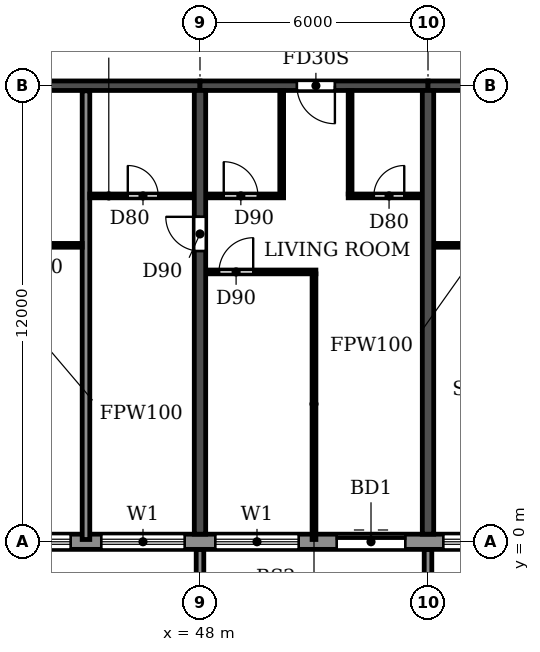
"""IFC4 building model, lengths in metres.
Left out: names, types, materials, properties, quantities, classifications, styles, units other than length and angle.
Written with IfcOpenShell. Run it as: python <this file> out.ifc"""

import sys

from ifc_helpers import new_model, si_unit, direction, frame, frame_2d, origin, place, context, subcontext, project, spatial, polyline, rectangle, outline, extrude, source, transform, mapped, element, fill, save


model = new_model("IFC4")
c1 = context("Model", 3, precision=1e-05, world=origin(), true_north=direction((0.0, 1.0)))
c2 = subcontext(c1, "Body", "Model", "MODEL_VIEW")
j1 = project(units=[si_unit("LENGTHUNIT", "METRE"), si_unit("PLANEANGLEUNIT", "RADIAN")], contexts=[c1])
p1 = place(None, origin())
s1 = spatial("IfcSite", under=j1, at=p1, CompositionType="ELEMENT")
p2 = place(p1, origin())
s2 = spatial("IfcBuilding", under=s1, at=p2, CompositionType="ELEMENT")
p3 = place(p2, frame((0.0, 0.0, 125.7)))
s3 = spatial("IfcBuildingStorey", under=s2, at=p3, CompositionType="ELEMENT", Elevation=125.7)
p4 = place(p3, frame((48.0, 0.2, 0.0), z_axis=(0.0, 0.0, 1.0), x_axis=(0.0, 1.0, 0.0)))
e1 = element("IfcWall", 1, at=p4, inside=s3, PredefinedType="SHEAR", context=c2, shape_type="SweptSolid", body=[
    extrude(rectangle(XDim=11.675, YDim=0.3, at=frame_2d((5.837, 0.0))), origin(), (0.0, 0.0, 1.0), 3.07),
])
p5 = place(p4, frame((7.45, 0.0, 0.0)))
e2 = element("IfcOpeningElement", 2, at=p5, cuts=e1, PredefinedType="OPENING", context=c2, shape_type="SweptSolid", body=[
    extrude(rectangle(XDim=0.9, YDim=2.1, at=frame_2d((0.45, 1.05))), frame((0.0, 0.16, 0.0), z_axis=(0.0, -1.0, 0.0), x_axis=(1.0, 0.0, 0.0)), (0.0, 0.0, 1.0), 0.32),
])
p6 = place(p3, frame((54.0, 0.2, 0.0), z_axis=(0.0, 0.0, 1.0), x_axis=(0.0, 1.0, 0.0)))
e3 = element("IfcWall", 3, at=p6, inside=s3, PredefinedType="SHEAR", context=c2, shape_type="SweptSolid", body=[
    extrude(rectangle(XDim=11.675, YDim=0.3, at=frame_2d((5.837, 0.0))), origin(), (0.0, 0.0, 1.0), 3.07),
])
p7 = place(p3, frame((42.0, 12.0, 0.0), z_axis=(0.0, 0.0, 1.0), x_axis=(1.0, 0.0, 0.0)))
e4 = element("IfcWall", 4, at=p7, inside=s3, PredefinedType="SHEAR", context=c2, shape_type="SweptSolid", body=[
    extrude(rectangle(XDim=6.0, YDim=0.25, at=frame_2d((3.0, 0.0))), origin(), (0.0, 0.0, 1.0), 2.47),
])
p8 = place(p3, frame((48.0, 12.0, 0.0), z_axis=(0.0, 0.0, 1.0), x_axis=(1.0, 0.0, 0.0)))
e5 = element("IfcWall", 5, at=p8, inside=s3, PredefinedType="SHEAR", context=c2, shape_type="SweptSolid", body=[
    extrude(rectangle(XDim=6.0, YDim=0.25, at=frame_2d((3.0, 0.0))), origin(), (0.0, 0.0, 1.0), 2.47),
])
p9 = place(p8, frame((2.55, 0.0, 0.0)))
e6 = element("IfcOpeningElement", 6, at=p9, cuts=e5, PredefinedType="OPENING", context=c2, shape_type="SweptSolid", body=[
    extrude(rectangle(XDim=1.0, YDim=2.1, at=frame_2d((0.5, 1.05))), frame((0.0, 0.135, 0.0), z_axis=(0.0, -1.0, 0.0), x_axis=(1.0, 0.0, 0.0)), (0.0, 0.0, 1.0), 0.27),
])
p10 = place(p3, frame((54.0, 12.0, 0.0), z_axis=(0.0, 0.0, 1.0), x_axis=(1.0, 0.0, 0.0)))
e7 = element("IfcWall", 7, at=p10, inside=s3, PredefinedType="SHEAR", context=c2, shape_type="SweptSolid", body=[
    extrude(rectangle(XDim=6.0, YDim=0.25, at=frame_2d((3.0, 0.0))), origin(), (0.0, 0.0, 1.0), 2.47),
])
p11 = place(p10, frame((2.45, 0.0, 0.0)))
e8 = element("IfcOpeningElement", 8, at=p11, cuts=e7, PredefinedType="OPENING", context=c2, shape_type="SweptSolid", body=[
    extrude(rectangle(XDim=1.0, YDim=2.1, at=frame_2d((0.5, 1.05))), frame((0.0, 0.135, 0.0), z_axis=(0.0, -1.0, 0.0), x_axis=(1.0, 0.0, 0.0)), (0.0, 0.0, 1.0), 0.27),
])
p12 = place(p3, frame((16.683, 0.0, 0.0), z_axis=(0.0, 0.0, 1.0), x_axis=(1.0, 0.0, 0.0)))
e9 = element("IfcWall", 9, at=p12, inside=s3, PredefinedType="STANDARD", context=c2, shape_type="SweptSolid", body=[
    extrude(rectangle(XDim=68.634, YDim=0.4, at=frame_2d((34.317, 0.0))), origin(), (0.0, 0.0, 1.0), 3.07),
])
p13 = place(p12, frame((1.717, 0.0, 0.9)))
e10 = element("IfcOpeningElement", 10, at=p13, cuts=e9, PredefinedType="OPENING", context=c2, shape_type="SweptSolid", body=[
    extrude(rectangle(XDim=2.2, YDim=1.5, at=frame_2d((1.1, 0.75))), frame((0.0, 0.21, 0.0), z_axis=(0.0, -1.0, 0.0), x_axis=(1.0, 0.0, 0.0)), (0.0, 0.0, 1.0), 0.42),
])
p14 = place(p12, frame((4.717, 0.0, 0.9)))
e11 = element("IfcOpeningElement", 11, at=p14, cuts=e9, PredefinedType="OPENING", context=c2, shape_type="SweptSolid", body=[
    extrude(rectangle(XDim=2.2, YDim=1.5, at=frame_2d((1.1, 0.75))), frame((0.0, 0.21, 0.0), z_axis=(0.0, -1.0, 0.0), x_axis=(1.0, 0.0, 0.0)), (0.0, 0.0, 1.0), 0.42),
])
p15 = place(p12, frame((7.717, 0.0, 0.9)))
e12 = element("IfcOpeningElement", 12, at=p15, cuts=e9, PredefinedType="OPENING", context=c2, shape_type="SweptSolid", body=[
    extrude(rectangle(XDim=2.2, YDim=1.5, at=frame_2d((1.1, 0.75))), frame((0.0, 0.21, 0.0), z_axis=(0.0, -1.0, 0.0), x_axis=(1.0, 0.0, 0.0)), (0.0, 0.0, 1.0), 0.42),
])
p16 = place(p12, frame((10.717, 0.0, 0.9)))
e13 = element("IfcOpeningElement", 13, at=p16, cuts=e9, PredefinedType="OPENING", context=c2, shape_type="SweptSolid", body=[
    extrude(rectangle(XDim=2.2, YDim=1.5, at=frame_2d((1.1, 0.75))), frame((0.0, 0.21, 0.0), z_axis=(0.0, -1.0, 0.0), x_axis=(1.0, 0.0, 0.0)), (0.0, 0.0, 1.0), 0.42),
])
p17 = place(p12, frame((13.717, 0.0, 0.9)))
e14 = element("IfcOpeningElement", 14, at=p17, cuts=e9, PredefinedType="OPENING", context=c2, shape_type="SweptSolid", body=[
    extrude(rectangle(XDim=2.2, YDim=1.5, at=frame_2d((1.1, 0.75))), frame((0.0, 0.21, 0.0), z_axis=(0.0, -1.0, 0.0), x_axis=(1.0, 0.0, 0.0)), (0.0, 0.0, 1.0), 0.42),
])
p18 = place(p12, frame((16.717, 0.0, 0.9)))
e15 = element("IfcOpeningElement", 15, at=p18, cuts=e9, PredefinedType="OPENING", context=c2, shape_type="SweptSolid", body=[
    extrude(rectangle(XDim=2.2, YDim=1.5, at=frame_2d((1.1, 0.75))), frame((0.0, 0.21, 0.0), z_axis=(0.0, -1.0, 0.0), x_axis=(1.0, 0.0, 0.0)), (0.0, 0.0, 1.0), 0.42),
])
p19 = place(p12, frame((19.717, 0.0, 0.9)))
e16 = element("IfcOpeningElement", 16, at=p19, cuts=e9, PredefinedType="OPENING", context=c2, shape_type="SweptSolid", body=[
    extrude(rectangle(XDim=2.2, YDim=1.5, at=frame_2d((1.1, 0.75))), frame((0.0, 0.21, 0.0), z_axis=(0.0, -1.0, 0.0), x_axis=(1.0, 0.0, 0.0)), (0.0, 0.0, 1.0), 0.42),
])
p20 = place(p12, frame((22.917, 0.0, 0.0)))
e17 = element("IfcOpeningElement", 17, at=p20, cuts=e9, PredefinedType="OPENING", context=c2, shape_type="SweptSolid", body=[
    extrude(rectangle(XDim=1.8, YDim=2.4, at=frame_2d((0.9, 1.2))), frame((0.0, 0.21, 0.0), z_axis=(0.0, -1.0, 0.0), x_axis=(1.0, 0.0, 0.0)), (0.0, 0.0, 1.0), 0.42),
])
p21 = place(p12, frame((25.717, 0.0, 0.9)))
e18 = element("IfcOpeningElement", 18, at=p21, cuts=e9, PredefinedType="OPENING", context=c2, shape_type="SweptSolid", body=[
    extrude(rectangle(XDim=2.2, YDim=1.5, at=frame_2d((1.1, 0.75))), frame((0.0, 0.21, 0.0), z_axis=(0.0, -1.0, 0.0), x_axis=(1.0, 0.0, 0.0)), (0.0, 0.0, 1.0), 0.42),
])
p22 = place(p12, frame((28.717, 0.0, 0.9)))
e19 = element("IfcOpeningElement", 19, at=p22, cuts=e9, PredefinedType="OPENING", context=c2, shape_type="SweptSolid", body=[
    extrude(rectangle(XDim=2.2, YDim=1.5, at=frame_2d((1.1, 0.75))), frame((0.0, 0.21, 0.0), z_axis=(0.0, -1.0, 0.0), x_axis=(1.0, 0.0, 0.0)), (0.0, 0.0, 1.0), 0.42),
])
p23 = place(p12, frame((31.717, 0.0, 0.9)))
e20 = element("IfcOpeningElement", 20, at=p23, cuts=e9, PredefinedType="OPENING", context=c2, shape_type="SweptSolid", body=[
    extrude(rectangle(XDim=2.2, YDim=1.5, at=frame_2d((1.1, 0.75))), frame((0.0, 0.21, 0.0), z_axis=(0.0, -1.0, 0.0), x_axis=(1.0, 0.0, 0.0)), (0.0, 0.0, 1.0), 0.42),
])
p24 = place(p12, frame((34.917, 0.0, 0.0)))
e21 = element("IfcOpeningElement", 21, at=p24, cuts=e9, PredefinedType="OPENING", context=c2, shape_type="SweptSolid", body=[
    extrude(rectangle(XDim=1.8, YDim=2.4, at=frame_2d((0.9, 1.2))), frame((0.0, 0.21, 0.0), z_axis=(0.0, -1.0, 0.0), x_axis=(1.0, 0.0, 0.0)), (0.0, 0.0, 1.0), 0.42),
])
p25 = place(p12, frame((37.717, 0.0, 0.9)))
e22 = element("IfcOpeningElement", 22, at=p25, cuts=e9, PredefinedType="OPENING", context=c2, shape_type="SweptSolid", body=[
    extrude(rectangle(XDim=2.2, YDim=1.5, at=frame_2d((1.1, 0.75))), frame((0.0, 0.21, 0.0), z_axis=(0.0, -1.0, 0.0), x_axis=(1.0, 0.0, 0.0)), (0.0, 0.0, 1.0), 0.42),
])
p26 = place(p12, frame((40.717, 0.0, 0.9)))
e23 = element("IfcOpeningElement", 23, at=p26, cuts=e9, PredefinedType="OPENING", context=c2, shape_type="SweptSolid", body=[
    extrude(rectangle(XDim=2.2, YDim=1.5, at=frame_2d((1.1, 0.75))), frame((0.0, 0.21, 0.0), z_axis=(0.0, -1.0, 0.0), x_axis=(1.0, 0.0, 0.0)), (0.0, 0.0, 1.0), 0.42),
])
p27 = place(p12, frame((43.717, 0.0, 0.9)))
e24 = element("IfcOpeningElement", 24, at=p27, cuts=e9, PredefinedType="OPENING", context=c2, shape_type="SweptSolid", body=[
    extrude(rectangle(XDim=2.2, YDim=1.5, at=frame_2d((1.1, 0.75))), frame((0.0, 0.21, 0.0), z_axis=(0.0, -1.0, 0.0), x_axis=(1.0, 0.0, 0.0)), (0.0, 0.0, 1.0), 0.42),
])
p28 = place(p12, frame((46.917, 0.0, 0.0)))
e25 = element("IfcOpeningElement", 25, at=p28, cuts=e9, PredefinedType="OPENING", context=c2, shape_type="SweptSolid", body=[
    extrude(rectangle(XDim=1.8, YDim=2.4, at=frame_2d((0.9, 1.2))), frame((0.0, 0.21, 0.0), z_axis=(0.0, -1.0, 0.0), x_axis=(1.0, 0.0, 0.0)), (0.0, 0.0, 1.0), 0.42),
])
p29 = place(p12, frame((49.717, 0.0, 0.9)))
e26 = element("IfcOpeningElement", 26, at=p29, cuts=e9, PredefinedType="OPENING", context=c2, shape_type="SweptSolid", body=[
    extrude(rectangle(XDim=2.2, YDim=1.5, at=frame_2d((1.1, 0.75))), frame((0.0, 0.21, 0.0), z_axis=(0.0, -1.0, 0.0), x_axis=(1.0, 0.0, 0.0)), (0.0, 0.0, 1.0), 0.42),
])
p30 = place(p12, frame((52.717, 0.0, 0.9)))
e27 = element("IfcOpeningElement", 27, at=p30, cuts=e9, PredefinedType="OPENING", context=c2, shape_type="SweptSolid", body=[
    extrude(rectangle(XDim=2.2, YDim=1.5, at=frame_2d((1.1, 0.75))), frame((0.0, 0.21, 0.0), z_axis=(0.0, -1.0, 0.0), x_axis=(1.0, 0.0, 0.0)), (0.0, 0.0, 1.0), 0.42),
])
p31 = place(p12, frame((55.717, 0.0, 0.9)))
e28 = element("IfcOpeningElement", 28, at=p31, cuts=e9, PredefinedType="OPENING", context=c2, shape_type="SweptSolid", body=[
    extrude(rectangle(XDim=2.2, YDim=1.5, at=frame_2d((1.1, 0.75))), frame((0.0, 0.21, 0.0), z_axis=(0.0, -1.0, 0.0), x_axis=(1.0, 0.0, 0.0)), (0.0, 0.0, 1.0), 0.42),
])
p32 = place(p12, frame((58.917, 0.0, 0.0)))
e29 = element("IfcOpeningElement", 29, at=p32, cuts=e9, PredefinedType="OPENING", context=c2, shape_type="SweptSolid", body=[
    extrude(rectangle(XDim=1.8, YDim=2.4, at=frame_2d((0.9, 1.2))), frame((0.0, 0.21, 0.0), z_axis=(0.0, -1.0, 0.0), x_axis=(1.0, 0.0, 0.0)), (0.0, 0.0, 1.0), 0.42),
])
p33 = place(p12, frame((61.717, 0.0, 0.9)))
e30 = element("IfcOpeningElement", 30, at=p33, cuts=e9, PredefinedType="OPENING", context=c2, shape_type="SweptSolid", body=[
    extrude(rectangle(XDim=2.2, YDim=1.5, at=frame_2d((1.1, 0.75))), frame((0.0, 0.21, 0.0), z_axis=(0.0, -1.0, 0.0), x_axis=(1.0, 0.0, 0.0)), (0.0, 0.0, 1.0), 0.42),
])
p34 = place(p12, frame((64.717, 0.0, 0.9)))
e31 = element("IfcOpeningElement", 31, at=p34, cuts=e9, PredefinedType="OPENING", context=c2, shape_type="SweptSolid", body=[
    extrude(rectangle(XDim=2.2, YDim=1.5, at=frame_2d((1.1, 0.75))), frame((0.0, 0.21, 0.0), z_axis=(0.0, -1.0, 0.0), x_axis=(1.0, 0.0, 0.0)), (0.0, 0.0, 1.0), 0.42),
])
m1 = source(origin(), c2, "Body", "SweptSolid", [
    extrude(outline(polyline([(0.0, 0.0), (0.2, 0.0), (0.2, 1.65), (0.0, 1.65), (0.0, 0.0)])), origin(), (0.0, 0.0, 1.0), 3.1),
])
for number, where in (
    (32, (47.9, -1.85, 0.0)),
    (33, (53.9, -1.85, 0.0)),
):
    element("IfcWall", number, at=place(p3, frame(where)), inside=s3, PredefinedType="STANDARD", context=c2, shape_type="MappedRepresentation", body=[
        mapped(m1, transform((0.0, 0.0, 0.0))),
    ])
p35 = place(p3, frame((45.0, 0.06, 0.0), z_axis=(0.0, 0.0, 1.0), x_axis=(0.0, 1.0, 0.0)))
e34 = element("IfcWall", 34, at=p35, inside=s3, PredefinedType="PARTITIONING", context=c2, shape_type="SweptSolid", body=[
    extrude(rectangle(XDim=11.805, YDim=0.2, at=frame_2d((5.902, 0.0))), origin(), (0.0, 0.0, 1.0), 3.07),
])
p36 = place(p3, frame((48.16, 7.1, 0.0), z_axis=(0.0, 0.0, 1.0), x_axis=(1.0, 0.0, 0.0)))
e35 = element("IfcWall", 35, at=p36, inside=s3, PredefinedType="PARTITIONING", context=c2, shape_type="SweptSolid", body=[
    extrude(rectangle(XDim=2.89, YDim=0.1, at=frame_2d((1.445, 0.0))), origin(), (0.0, 0.0, 1.0), 3.07),
])
p37 = place(p36, frame((0.34, 0.0, 0.0)))
e36 = element("IfcOpeningElement", 36, at=p37, cuts=e35, PredefinedType="OPENING", context=c2, shape_type="SweptSolid", body=[
    extrude(rectangle(XDim=0.9, YDim=2.1, at=frame_2d((0.45, 1.05))), frame((0.0, 0.06, 0.0), z_axis=(0.0, -1.0, 0.0), x_axis=(1.0, 0.0, 0.0)), (0.0, 0.0, 1.0), 0.12),
])
p38 = place(p3, frame((42.16, 7.8, 0.0), z_axis=(0.0, 0.0, 1.0), x_axis=(1.0, 0.0, 0.0)))
e37 = element("IfcWall", 37, at=p38, inside=s3, PredefinedType="PARTITIONING", context=c2, shape_type="SweptSolid", body=[
    extrude(rectangle(XDim=2.74, YDim=0.1, at=frame_2d((1.37, 0.0))), origin(), (0.0, 0.0, 1.0), 3.07),
])
p39 = place(p38, frame((0.94, 0.0, 0.0)))
e38 = element("IfcOpeningElement", 38, at=p39, cuts=e37, PredefinedType="OPENING", context=c2, shape_type="SweptSolid", body=[
    extrude(rectangle(XDim=0.8, YDim=2.1, at=frame_2d((0.4, 1.05))), frame((0.0, 0.06, 0.0), z_axis=(0.0, -1.0, 0.0), x_axis=(1.0, 0.0, 0.0)), (0.0, 0.0, 1.0), 0.12),
])
p40 = place(p3, frame((54.16, 7.8, 0.0), z_axis=(0.0, 0.0, 1.0), x_axis=(1.0, 0.0, 0.0)))
e39 = element("IfcWall", 39, at=p40, inside=s3, PredefinedType="PARTITIONING", context=c2, shape_type="SweptSolid", body=[
    extrude(rectangle(XDim=1.94, YDim=0.1, at=frame_2d((0.97, 0.0))), origin(), (0.0, 0.0, 1.0), 3.07),
])
p41 = place(p3, frame((45.1, 9.1, 0.0), z_axis=(0.0, 0.0, 1.0), x_axis=(1.0, 0.0, 0.0)))
e40 = element("IfcWall", 40, at=p41, inside=s3, PredefinedType="PARTITIONING", context=c2, shape_type="SweptSolid", body=[
    extrude(rectangle(XDim=2.74, YDim=0.1, at=frame_2d((1.37, 0.0))), origin(), (0.0, 0.0, 1.0), 3.07),
])
p42 = place(p41, frame((1.0, 0.0, 0.0)))
e41 = element("IfcOpeningElement", 41, at=p42, cuts=e40, PredefinedType="OPENING", context=c2, shape_type="SweptSolid", body=[
    extrude(rectangle(XDim=0.8, YDim=2.1, at=frame_2d((0.4, 1.05))), frame((0.0, 0.06, 0.0), z_axis=(0.0, -1.0, 0.0), x_axis=(1.0, 0.0, 0.0)), (0.0, 0.0, 1.0), 0.12),
])
p43 = place(p3, frame((48.16, 9.1, 0.0), z_axis=(0.0, 0.0, 1.0), x_axis=(1.0, 0.0, 0.0)))
e42 = element("IfcWall", 42, at=p43, inside=s3, PredefinedType="PARTITIONING", context=c2, shape_type="SweptSolid", body=[
    extrude(rectangle(XDim=2.04, YDim=0.1, at=frame_2d((1.02, 0.0))), origin(), (0.0, 0.0, 1.0), 3.07),
])
p44 = place(p43, frame((0.465, 0.0, 0.0)))
e43 = element("IfcOpeningElement", 43, at=p44, cuts=e42, PredefinedType="OPENING", context=c2, shape_type="SweptSolid", body=[
    extrude(rectangle(XDim=0.9, YDim=2.1, at=frame_2d((0.45, 1.05))), frame((0.0, 0.06, 0.0), z_axis=(0.0, -1.0, 0.0), x_axis=(1.0, 0.0, 0.0)), (0.0, 0.0, 1.0), 0.12),
])
p45 = place(p3, frame((51.9, 9.1, 0.0), z_axis=(0.0, 0.0, 1.0), x_axis=(1.0, 0.0, 0.0)))
e44 = element("IfcWall", 44, at=p45, inside=s3, PredefinedType="PARTITIONING", context=c2, shape_type="SweptSolid", body=[
    extrude(rectangle(XDim=1.94, YDim=0.1, at=frame_2d((0.97, 0.0))), origin(), (0.0, 0.0, 1.0), 3.07),
])
p46 = place(p45, frame((0.675, 0.0, 0.0)))
e45 = element("IfcOpeningElement", 45, at=p46, cuts=e44, PredefinedType="OPENING", context=c2, shape_type="SweptSolid", body=[
    extrude(rectangle(XDim=0.8, YDim=2.1, at=frame_2d((0.4, 1.05))), frame((0.0, 0.06, 0.0), z_axis=(0.0, -1.0, 0.0), x_axis=(1.0, 0.0, 0.0)), (0.0, 0.0, 1.0), 0.12),
])
p47 = place(p3, frame((50.15, 9.15, 0.0), z_axis=(0.0, 0.0, 1.0), x_axis=(0.0, 1.0, 0.0)))
e46 = element("IfcWall", 46, at=p47, inside=s3, PredefinedType="PARTITIONING", context=c2, shape_type="SweptSolid", body=[
    extrude(rectangle(XDim=2.715, YDim=0.1, at=frame_2d((1.357, 0.0))), origin(), (0.0, 0.0, 1.0), 3.07),
])
p48 = place(p3, frame((51.0, 0.06, 0.0), z_axis=(0.0, 0.0, 1.0), x_axis=(0.0, 1.0, 0.0)))
e47 = element("IfcWall", 47, at=p48, inside=s3, PredefinedType="PARTITIONING", context=c2, shape_type="SweptSolid", body=[
    extrude(rectangle(XDim=6.99, YDim=0.1, at=frame_2d((3.495, 0.0))), origin(), (0.0, 0.0, 1.0), 3.07),
])
p49 = place(p3, frame((51.95, 9.15, 0.0), z_axis=(0.0, 0.0, 1.0), x_axis=(0.0, 1.0, 0.0)))
e48 = element("IfcWall", 48, at=p49, inside=s3, PredefinedType="PARTITIONING", context=c2, shape_type="SweptSolid", body=[
    extrude(rectangle(XDim=2.715, YDim=0.1, at=frame_2d((1.357, 0.0))), origin(), (0.0, 0.0, 1.0), 3.07),
])
p50 = place(p21, origin())
e49 = element("IfcWindow", 49, at=p50, inside=s3, PartitioningType="DOUBLE_PANEL_HORIZONTAL", PredefinedType="WINDOW", context=c2, shape_type="SweptSolid", body=[
    extrude(rectangle(XDim=2.2, YDim=1.5, at=frame_2d((1.1, 0.75))), frame((0.0, 0.03, 0.0), z_axis=(0.0, -1.0, 0.0), x_axis=(1.0, 0.0, 0.0)), (0.0, 0.0, 1.0), 0.06),
])
fill(e18, e49)
p51 = place(p22, origin())
e50 = element("IfcWindow", 50, at=p51, inside=s3, PartitioningType="DOUBLE_PANEL_HORIZONTAL", PredefinedType="WINDOW", context=c2, shape_type="SweptSolid", body=[
    extrude(rectangle(XDim=2.2, YDim=1.5, at=frame_2d((1.1, 0.75))), frame((0.0, 0.03, 0.0), z_axis=(0.0, -1.0, 0.0), x_axis=(1.0, 0.0, 0.0)), (0.0, 0.0, 1.0), 0.06),
])
fill(e19, e50)
p52 = place(p23, origin())
e51 = element("IfcWindow", 51, at=p52, inside=s3, PartitioningType="DOUBLE_PANEL_HORIZONTAL", PredefinedType="WINDOW", context=c2, shape_type="SweptSolid", body=[
    extrude(rectangle(XDim=2.2, YDim=1.5, at=frame_2d((1.1, 0.75))), frame((0.0, 0.03, 0.0), z_axis=(0.0, -1.0, 0.0), x_axis=(1.0, 0.0, 0.0)), (0.0, 0.0, 1.0), 0.06),
])
fill(e20, e51)
p53 = place(p24, origin())
e52 = element("IfcDoor", 52, at=p53, inside=s3, OperationType="DOUBLE_DOOR_SLIDING", PredefinedType="DOOR", context=c2, shape_type="SweptSolid", body=[
    extrude(rectangle(XDim=1.8, YDim=2.4, at=frame_2d((0.9, 1.2))), frame((0.0, 0.025, 0.0), z_axis=(0.0, -1.0, 0.0), x_axis=(1.0, 0.0, 0.0)), (0.0, 0.0, 1.0), 0.05),
])
fill(e21, e52)
p54 = place(p25, origin())
e53 = element("IfcWindow", 53, at=p54, inside=s3, PartitioningType="DOUBLE_PANEL_HORIZONTAL", PredefinedType="WINDOW", context=c2, shape_type="SweptSolid", body=[
    extrude(rectangle(XDim=2.2, YDim=1.5, at=frame_2d((1.1, 0.75))), frame((0.0, 0.03, 0.0), z_axis=(0.0, -1.0, 0.0), x_axis=(1.0, 0.0, 0.0)), (0.0, 0.0, 1.0), 0.06),
])
fill(e22, e53)
p55 = place(p42, origin())
e54 = element("IfcDoor", 54, at=p55, inside=s3, OperationType="SINGLE_SWING_LEFT", PredefinedType="DOOR", context=c2, shape_type="SweptSolid", body=[
    extrude(rectangle(XDim=0.8, YDim=2.1, at=frame_2d((0.4, 1.05))), frame((0.0, 0.025, 0.0), z_axis=(0.0, -1.0, 0.0), x_axis=(1.0, 0.0, 0.0)), (0.0, 0.0, 1.0), 0.05),
])
fill(e41, e54)
p56 = place(p5, origin())
e55 = element("IfcDoor", 55, at=p56, inside=s3, OperationType="SINGLE_SWING_RIGHT", PredefinedType="DOOR", context=c2, shape_type="SweptSolid", body=[
    extrude(rectangle(XDim=0.9, YDim=2.1, at=frame_2d((0.45, 1.05))), frame((0.0, 0.025, 0.0), z_axis=(0.0, -1.0, 0.0), x_axis=(1.0, 0.0, 0.0)), (0.0, 0.0, 1.0), 0.05),
])
fill(e2, e55)
p57 = place(p37, origin())
e56 = element("IfcDoor", 56, at=p57, inside=s3, OperationType="SINGLE_SWING_RIGHT", PredefinedType="DOOR", context=c2, shape_type="SweptSolid", body=[
    extrude(rectangle(XDim=0.9, YDim=2.1, at=frame_2d((0.45, 1.05))), frame((0.0, 0.025, 0.0), z_axis=(0.0, -1.0, 0.0), x_axis=(1.0, 0.0, 0.0)), (0.0, 0.0, 1.0), 0.05),
])
fill(e36, e56)
p58 = place(p44, origin())
e57 = element("IfcDoor", 57, at=p58, inside=s3, OperationType="SINGLE_SWING_LEFT", PredefinedType="DOOR", context=c2, shape_type="SweptSolid", body=[
    extrude(rectangle(XDim=0.9, YDim=2.1, at=frame_2d((0.45, 1.05))), frame((0.0, 0.025, 0.0), z_axis=(0.0, -1.0, 0.0), x_axis=(1.0, 0.0, 0.0)), (0.0, 0.0, 1.0), 0.05),
])
fill(e43, e57)
p59 = place(p9, frame((1.0, 0.0, 0.0), z_axis=(0.0, 0.0, 1.0), x_axis=(-1.0, 0.0, 0.0)))
e58 = element("IfcDoor", 58, at=p59, inside=s3, OperationType="SINGLE_SWING_LEFT", PredefinedType="DOOR", context=c2, shape_type="SweptSolid", body=[
    extrude(rectangle(XDim=1.0, YDim=2.1, at=frame_2d((0.5, 1.05))), frame((0.0, 0.025, 0.0), z_axis=(0.0, -1.0, 0.0), x_axis=(1.0, 0.0, 0.0)), (0.0, 0.0, 1.0), 0.05),
])
fill(e6, e58)
p60 = place(p46, origin())
e59 = element("IfcDoor", 59, at=p60, inside=s3, OperationType="SINGLE_SWING_RIGHT", PredefinedType="DOOR", context=c2, shape_type="SweptSolid", body=[
    extrude(rectangle(XDim=0.8, YDim=2.1, at=frame_2d((0.4, 1.05))), frame((0.0, 0.025, 0.0), z_axis=(0.0, -1.0, 0.0), x_axis=(1.0, 0.0, 0.0)), (0.0, 0.0, 1.0), 0.05),
])
fill(e45, e59)
save(model, sys.argv[1])
